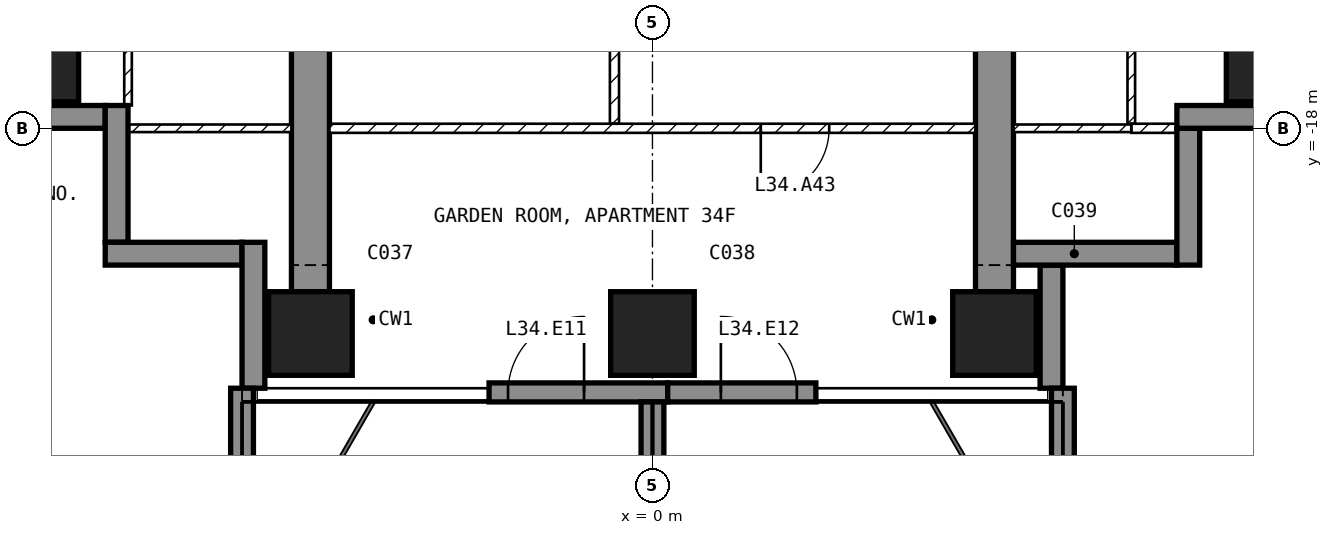
"""IFC4 building model, lengths in metres.
Left out: names, types, materials, properties, quantities, classifications, styles, units other than length and angle.
Written with IfcOpenShell. Run it as: python <this file> out.ifc"""

import sys

from ifc_helpers import new_model, si_unit, direction, frame, frame_2d, origin, origin_2d, place, context, subcontext, project, spatial, polyline, rectangle, outline, extrude, element, fill, save


model = new_model("IFC4")
c1 = context("Model", 3, precision=1e-05, world=origin(), true_north=direction((0.0, 1.0)))
c2 = subcontext(c1, "Body", "Model", "MODEL_VIEW")
j1 = project(units=[si_unit("LENGTHUNIT", "METRE"), si_unit("PLANEANGLEUNIT", "RADIAN")], contexts=[c1])
p1 = place(None, origin())
s1 = spatial("IfcSite", under=j1, at=p1, CompositionType="ELEMENT")
p2 = place(p1, origin())
s2 = spatial("IfcBuilding", under=s1, at=p2, CompositionType="ELEMENT")
p3 = place(p2, frame((0.0, 0.0, 140.9)))
s3 = spatial("IfcBuildingStorey", under=s2, at=p3, CompositionType="ELEMENT", Elevation=140.9)
for number, where, z_axis, x_axis in (
    (1, (-8.1, -17.1, -0.25), (0.0, 0.0, 1.0), (1.0, 0.0, 0.0)),
    (2, (-4.5, -20.7, -0.25), (0.0, 0.0, 1.0), (1.0, 0.0, 0.0)),
    (3, (0.0, -20.7, -0.25), (0.0, 0.0, 1.0), (1.0, 0.0, 0.0)),
    (4, (4.5, -20.7, -0.25), (0.0, 0.0, 1.0), (1.0, 0.0, 0.0)),
    (5, (8.1, -17.1, -0.25), (0.0, 0.0, 1.0), (1.0, 0.0, 0.0)),
):
    element("IfcColumn", number, at=place(p3, frame(where, z_axis=z_axis, x_axis=x_axis)), inside=s3, PredefinedType="COLUMN", context=c2, shape_type="SweptSolid", body=[
        extrude(rectangle(XDim=1.1, YDim=1.1, at=origin_2d()), origin(), (0.0, 0.0, 1.0), 3.5),
    ])
for number, where, z_axis, x_axis in (
    (6, (-4.75, -20.15, -0.25), (1.0, 0.0, 0.0), (0.0, 1.0, 0.0)),
    (7, (4.25, -20.15, -0.25), (1.0, 0.0, 0.0), (0.0, 1.0, 0.0)),
):
    element("IfcWall", number, at=place(p3, frame(where, z_axis=z_axis, x_axis=x_axis)), inside=s3, PredefinedType="SHEAR", context=c2, shape_type="SweptSolid", body=[
        extrude(outline(polyline([(0.0, 0.0), (6.65, 0.0), (6.65, 2.65), (9.05, 2.65), (9.05, 0.0), (11.15, 0.0), (11.15, 3.5), (0.0, 3.5), (0.0, 0.0)])), origin(), (0.0, 0.0, 1.0), 0.5),
    ])
p4 = place(p3, frame((-2.15, -21.475, 0.0), z_axis=(0.0, 0.0, 1.0), x_axis=(1.0, 0.0, 0.0)))
e8 = element("IfcWall", 8, at=p4, inside=s3, PredefinedType="SOLIDWALL", context=c2, shape_type="SweptSolid", body=[
    extrude(rectangle(XDim=2.35, YDim=0.25, at=frame_2d((1.175, 0.0))), origin(), (0.0, 0.0, 1.0), 3.25),
])
p5 = place(p4, frame((0.25, 0.0, 0.0)))
e9 = element("IfcOpeningElement", 9, at=p5, cuts=e8, PredefinedType="OPENING", context=c2, shape_type="SweptSolid", body=[
    extrude(rectangle(XDim=1.0, YDim=2.4, at=frame_2d((0.5, 1.2))), frame((0.0, 0.135, 0.0), z_axis=(0.0, -1.0, 0.0), x_axis=(1.0, 0.0, 0.0)), (0.0, 0.0, 1.0), 0.27),
])
p6 = place(p3, frame((0.2, -21.475, 0.0), z_axis=(0.0, 0.0, 1.0), x_axis=(1.0, 0.0, 0.0)))
e10 = element("IfcWall", 10, at=p6, inside=s3, PredefinedType="SOLIDWALL", context=c2, shape_type="SweptSolid", body=[
    extrude(rectangle(XDim=1.95, YDim=0.25, at=frame_2d((0.975, 0.0))), origin(), (0.0, 0.0, 1.0), 3.25),
])
p7 = place(p6, frame((0.7, 0.0, 0.0)))
e11 = element("IfcOpeningElement", 11, at=p7, cuts=e10, PredefinedType="OPENING", context=c2, shape_type="SweptSolid", body=[
    extrude(rectangle(XDim=1.0, YDim=2.4, at=frame_2d((0.5, 1.2))), frame((0.0, 0.135, 0.0), z_axis=(0.0, -1.0, 0.0), x_axis=(1.0, 0.0, 0.0)), (0.0, 0.0, 1.0), 0.27),
])
p8 = place(p3, frame((5.25, -21.42, 0.0), z_axis=(0.0, 0.0, 1.0), x_axis=(0.0, 1.0, 0.0)))
e12 = element("IfcWall", 12, at=p8, inside=s3, PredefinedType="SOLIDWALL", context=c2, shape_type="SweptSolid", body=[
    extrude(rectangle(XDim=1.62, YDim=0.3, at=frame_2d((0.81, 0.0))), origin(), (0.0, 0.0, 1.0), 3.25),
])
p9 = place(p3, frame((4.75, -19.65, 0.0), z_axis=(0.0, 0.0, 1.0), x_axis=(1.0, 0.0, 0.0)))
e13 = element("IfcWall", 13, at=p9, inside=s3, PredefinedType="SOLIDWALL", context=c2, shape_type="SweptSolid", body=[
    extrude(rectangle(XDim=2.15, YDim=0.3, at=frame_2d((1.075, 0.0))), origin(), (0.0, 0.0, 1.0), 3.25),
])
p10 = place(p3, frame((7.05, -19.8, 0.0), z_axis=(0.0, 0.0, 1.0), x_axis=(0.0, 1.0, 0.0)))
e14 = element("IfcWall", 14, at=p10, inside=s3, PredefinedType="SOLIDWALL", context=c2, shape_type="SweptSolid", body=[
    extrude(rectangle(XDim=1.8, YDim=0.3, at=frame_2d((0.9, 0.0))), origin(), (0.0, 0.0, 1.0), 3.25),
])
p11 = place(p3, frame((6.9, -17.85, 0.0), z_axis=(0.0, 0.0, 1.0), x_axis=(1.0, 0.0, 0.0)))
e15 = element("IfcWall", 15, at=p11, inside=s3, PredefinedType="SOLIDWALL", context=c2, shape_type="SweptSolid", body=[
    extrude(rectangle(XDim=1.85, YDim=0.3, at=frame_2d((0.925, 0.0))), origin(), (0.0, 0.0, 1.0), 3.25),
])
p12 = place(p3, frame((-8.75, -17.85, 0.0), z_axis=(0.0, 0.0, 1.0), x_axis=(1.0, 0.0, 0.0)))
e16 = element("IfcWall", 16, at=p12, inside=s3, PredefinedType="SOLIDWALL", context=c2, shape_type="SweptSolid", body=[
    extrude(rectangle(XDim=1.55, YDim=0.3, at=frame_2d((0.775, 0.0))), origin(), (0.0, 0.0, 1.0), 3.25),
])
for number, where, z_axis, x_axis in (
    (17, (-7.05, -17.7, 0.0), (0.0, 0.0, 1.0), (0.0, -1.0, 0.0)),
    (18, (-7.2, -19.65, 0.0), (0.0, 0.0, 1.0), (1.0, 0.0, 0.0)),
):
    element("IfcWall", number, at=place(p3, frame(where, z_axis=z_axis, x_axis=x_axis)), inside=s3, PredefinedType="SOLIDWALL", context=c2, shape_type="SweptSolid", body=[
        extrude(rectangle(XDim=1.8, YDim=0.3, at=frame_2d((0.9, 0.0))), origin(), (0.0, 0.0, 1.0), 3.25),
    ])
p13 = place(p3, frame((-5.25, -19.5, 0.0), z_axis=(0.0, 0.0, 1.0), x_axis=(0.0, -1.0, 0.0)))
e19 = element("IfcWall", 19, at=p13, inside=s3, PredefinedType="SOLIDWALL", context=c2, shape_type="SweptSolid", body=[
    extrude(rectangle(XDim=1.92, YDim=0.3, at=frame_2d((0.96, 0.0))), origin(), (0.0, 0.0, 1.0), 3.25),
])
p14 = place(p3, frame((-5.4, -21.42, 0.0), z_axis=(0.0, 0.0, 1.0), x_axis=(0.0, -1.0, 0.0)))
e20 = element("IfcWall", 20, at=p14, inside=s3, PredefinedType="SOLIDWALL", context=c2, shape_type="SweptSolid", body=[
    extrude(rectangle(XDim=2.88, YDim=0.3, at=frame_2d((1.44, 0.0))), origin(), (0.0, 0.0, 1.0), 3.25),
])
p15 = place(p3, frame((0.0, -21.6, 0.0), z_axis=(0.0, 0.0, 1.0), x_axis=(0.0, -1.0, 0.0)))
e21 = element("IfcWall", 21, at=p15, inside=s3, PredefinedType="SOLIDWALL", context=c2, shape_type="SweptSolid", body=[
    extrude(rectangle(XDim=2.7, YDim=0.3, at=frame_2d((1.35, 0.0))), origin(), (0.0, 0.0, 1.0), 3.25),
])
p16 = place(p3, frame((5.4, -21.42, 0.0), z_axis=(0.0, 0.0, 1.0), x_axis=(0.0, -1.0, 0.0)))
e22 = element("IfcWall", 22, at=p16, inside=s3, PredefinedType="SOLIDWALL", context=c2, shape_type="SweptSolid", body=[
    extrude(rectangle(XDim=2.88, YDim=0.3, at=frame_2d((1.44, 0.0))), origin(), (0.0, 0.0, 1.0), 3.25),
])
p17 = place(p3, frame((-0.5, -17.94, 0.0), z_axis=(0.0, 0.0, 1.0), x_axis=(0.0, 1.0, 0.0)))
e23 = element("IfcWall", 23, at=p17, inside=s3, PredefinedType="PARTITIONING", context=c2, shape_type="SweptSolid", body=[
    extrude(rectangle(XDim=2.88, YDim=0.12, at=frame_2d((1.44, 0.0))), origin(), (0.0, 0.0, 1.0), 3.25),
])
p18 = place(p17, frame((0.99, 0.0, 0.0)))
e24 = element("IfcOpeningElement", 24, at=p18, cuts=e23, PredefinedType="OPENING", context=c2, shape_type="SweptSolid", body=[
    extrude(rectangle(XDim=0.9, YDim=2.1, at=frame_2d((0.45, 1.05))), frame((0.0, 0.07, 0.0), z_axis=(0.0, -1.0, 0.0), x_axis=(1.0, 0.0, 0.0)), (0.0, 0.0, 1.0), 0.14),
])
p19 = place(p3, frame((4.25, -18.0, 0.0), z_axis=(0.0, 0.0, 1.0), x_axis=(-1.0, 0.0, 0.0)))
e25 = element("IfcWall", 25, at=p19, inside=s3, PredefinedType="PARTITIONING", context=c2, shape_type="SweptSolid", body=[
    extrude(rectangle(XDim=8.5, YDim=0.12, at=frame_2d((4.25, 0.0))), origin(), (0.0, 0.0, 1.0), 3.25),
])
p20 = place(p19, frame((1.925, 0.0, 0.0)))
e26 = element("IfcOpeningElement", 26, at=p20, cuts=e25, PredefinedType="OPENING", context=c2, shape_type="SweptSolid", body=[
    extrude(rectangle(XDim=0.9, YDim=2.1, at=frame_2d((0.45, 1.05))), frame((0.0, 0.07, 0.0), z_axis=(0.0, -1.0, 0.0), x_axis=(1.0, 0.0, 0.0)), (0.0, 0.0, 1.0), 0.14),
])
p21 = place(p3, frame((6.3, -17.94, 0.0), z_axis=(0.0, 0.0, 1.0), x_axis=(0.0, 1.0, 0.0)))
e27 = element("IfcWall", 27, at=p21, inside=s3, PredefinedType="PARTITIONING", context=c2, shape_type="SweptSolid", body=[
    extrude(rectangle(XDim=3.49, YDim=0.1, at=frame_2d((1.745, 0.0))), origin(), (0.0, 0.0, 1.0), 3.25),
])
p22 = place(p21, frame((1.32, 0.0, 0.0)))
e28 = element("IfcOpeningElement", 28, at=p22, cuts=e27, PredefinedType="OPENING", context=c2, shape_type="SweptSolid", body=[
    extrude(rectangle(XDim=0.85, YDim=2.1, at=frame_2d((0.425, 1.05))), frame((0.0, 0.06, 0.0), z_axis=(0.0, -1.0, 0.0), x_axis=(1.0, 0.0, 0.0)), (0.0, 0.0, 1.0), 0.12),
])
p23 = place(p3, frame((7.12, -18.0, 0.0), z_axis=(0.0, 0.0, 1.0), x_axis=(-1.0, 0.0, 0.0)))
e29 = element("IfcWall", 29, at=p23, inside=s3, PredefinedType="PARTITIONING", context=c2, shape_type="SweptSolid", body=[
    extrude(rectangle(XDim=0.82, YDim=0.12, at=frame_2d((0.41, 0.0))), origin(), (0.0, 0.0, 1.0), 3.25),
])
p24 = place(p3, frame((6.3, -18.0, 0.0), z_axis=(0.0, 0.0, 1.0), x_axis=(-1.0, 0.0, 0.0)))
e30 = element("IfcWall", 30, at=p24, inside=s3, PredefinedType="PARTITIONING", context=c2, shape_type="SweptSolid", body=[
    extrude(rectangle(XDim=1.55, YDim=0.1, at=frame_2d((0.775, 0.0))), origin(), (0.0, 0.0, 1.0), 3.25),
])
p25 = place(p3, frame((-6.9, -14.45, 0.0), z_axis=(0.0, 0.0, 1.0), x_axis=(0.0, -1.0, 0.0)))
e31 = element("IfcWall", 31, at=p25, inside=s3, PredefinedType="PARTITIONING", context=c2, shape_type="SweptSolid", body=[
    extrude(rectangle(XDim=3.25, YDim=0.1, at=frame_2d((1.625, 0.0))), origin(), (0.0, 0.0, 1.0), 3.25),
])
p26 = place(p3, frame((-4.75, -18.0, 0.0), z_axis=(0.0, 0.0, 1.0), x_axis=(-1.0, 0.0, 0.0)))
e32 = element("IfcWall", 32, at=p26, inside=s3, PredefinedType="PARTITIONING", context=c2, shape_type="SweptSolid", body=[
    extrude(rectangle(XDim=2.37, YDim=0.1, at=frame_2d((1.185, 0.0))), origin(), (0.0, 0.0, 1.0), 3.25),
])
p27 = place(p5, origin())
e33 = element("IfcDoor", 33, at=p27, inside=s3, OperationType="SINGLE_SWING_RIGHT", PredefinedType="DOOR", context=c2, shape_type="SweptSolid", body=[
    extrude(rectangle(XDim=1.0, YDim=2.4, at=frame_2d((0.5, 1.2))), frame((0.0, 0.025, 0.0), z_axis=(0.0, -1.0, 0.0), x_axis=(1.0, 0.0, 0.0)), (0.0, 0.0, 1.0), 0.05),
])
fill(e9, e33)
p28 = place(p7, origin())
e34 = element("IfcDoor", 34, at=p28, inside=s3, OperationType="SINGLE_SWING_LEFT", PredefinedType="DOOR", context=c2, shape_type="SweptSolid", body=[
    extrude(rectangle(XDim=1.0, YDim=2.4, at=frame_2d((0.5, 1.2))), frame((0.0, 0.025, 0.0), z_axis=(0.0, -1.0, 0.0), x_axis=(1.0, 0.0, 0.0)), (0.0, 0.0, 1.0), 0.05),
])
fill(e11, e34)
p29 = place(p20, origin())
e35 = element("IfcDoor", 35, at=p29, inside=s3, OperationType="SINGLE_SWING_RIGHT", PredefinedType="DOOR", context=c2, shape_type="SweptSolid", body=[
    extrude(rectangle(XDim=0.9, YDim=2.1, at=frame_2d((0.45, 1.05))), frame((0.0, 0.025, 0.0), z_axis=(0.0, -1.0, 0.0), x_axis=(1.0, 0.0, 0.0)), (0.0, 0.0, 1.0), 0.05),
])
fill(e26, e35)
save(model, sys.argv[1])
